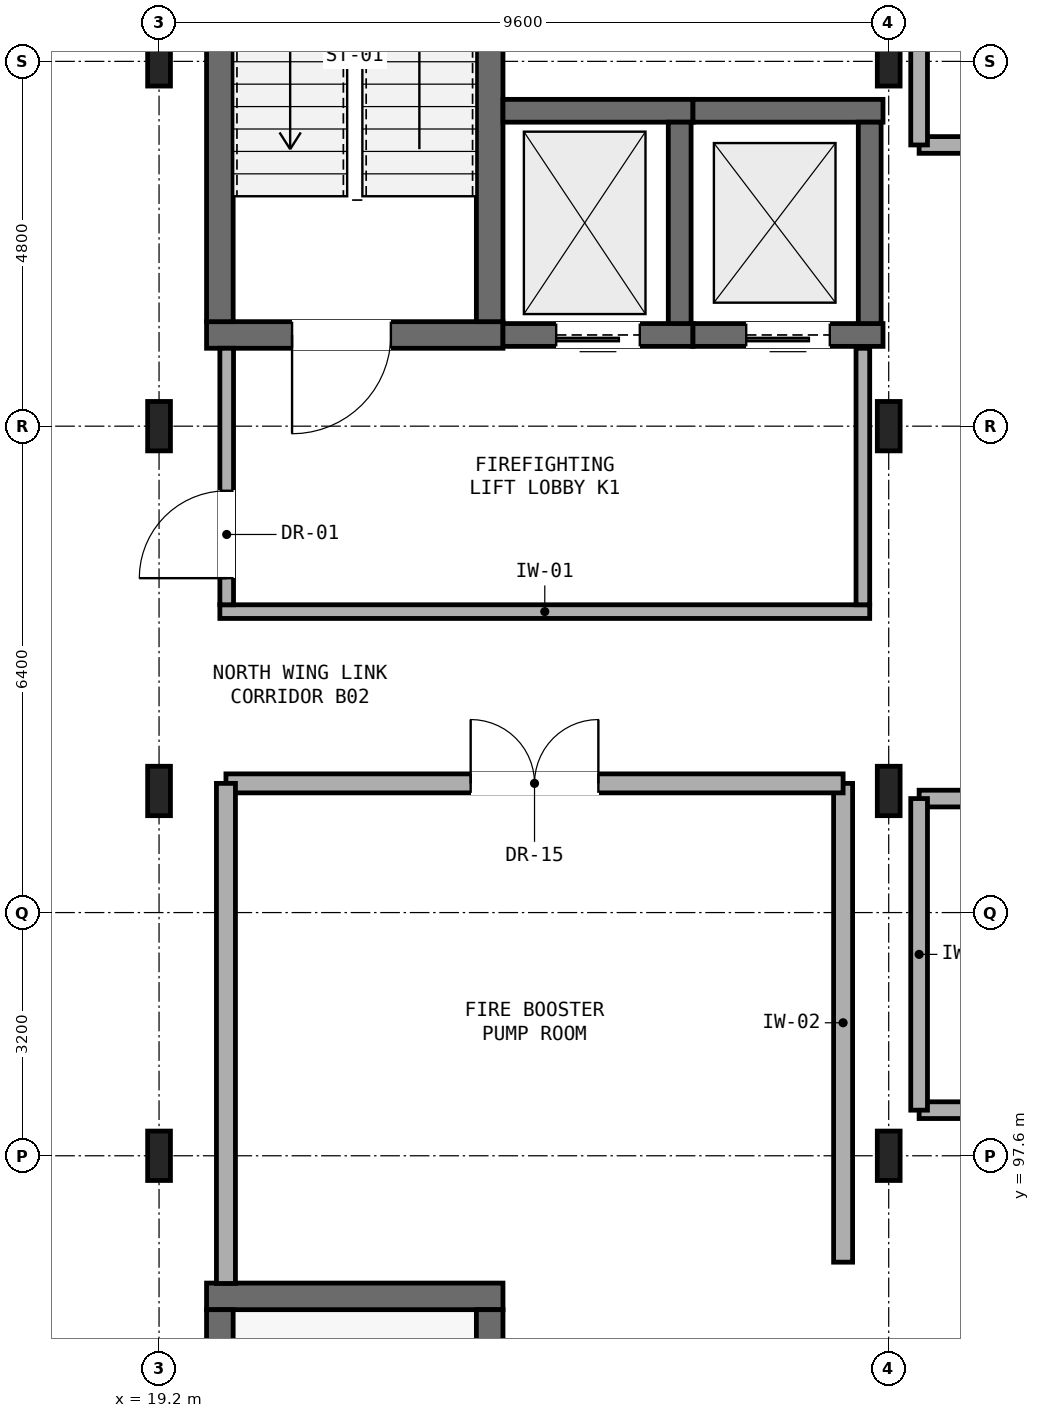
"""IFC4 building model, lengths in metres.
Left out: names, types, materials, properties, quantities, classifications, styles, units other than length and angle.
Written with IfcOpenShell. Run it as: python <this file> out.ifc"""

import sys

from ifc_helpers import new_model, si_unit, direction, frame, frame_2d, origin, origin_2d, place, context, subcontext, project, spatial, rectangle, i_section, extrude, element, fill, save


model = new_model("IFC4")
c1 = context("Model", 3, precision=1e-05, world=origin(), true_north=direction((0.0, 1.0)))
c2 = subcontext(c1, "Body", "Model", "MODEL_VIEW")
j1 = project(units=[si_unit("LENGTHUNIT", "METRE"), si_unit("PLANEANGLEUNIT", "RADIAN")], contexts=[c1])
p1 = place(None, origin())
s1 = spatial("IfcSite", under=j1, at=p1, CompositionType="ELEMENT")
p2 = place(p1, origin())
s2 = spatial("IfcBuilding", under=s1, at=p2, CompositionType="ELEMENT")
p3 = place(p2, frame((0.0, 0.0, -9.8)))
s3 = spatial("IfcBuildingStorey", under=s2, at=p3, CompositionType="ELEMENT", Elevation=-9.8)
for number, where, z_axis, x_axis in (
    (1, (28.8, 97.6, 0.0), (0.0, 0.0, 1.0), (1.0, 0.0, 0.0)),
    (2, (28.8, 102.4, 0.0), (0.0, 0.0, 1.0), (1.0, 0.0, 0.0)),
    (3, (28.8, 107.2, 0.0), (0.0, 0.0, 1.0), (1.0, 0.0, 0.0)),
    (4, (28.8, 112.0, 0.0), (0.0, 0.0, 1.0), (1.0, 0.0, 0.0)),
    (5, (19.2, 97.6, 0.0), (0.0, 0.0, 1.0), (1.0, 0.0, 0.0)),
    (6, (19.2, 102.4, 0.0), (0.0, 0.0, 1.0), (1.0, 0.0, 0.0)),
    (7, (19.2, 107.2, 0.0), (0.0, 0.0, 1.0), (1.0, 0.0, 0.0)),
    (8, (19.2, 112.0, 0.0), (0.0, 0.0, 1.0), (1.0, 0.0, 0.0)),
):
    element("IfcColumn", number, at=place(p3, frame(where, z_axis=z_axis, x_axis=x_axis)), inside=s3, PredefinedType="COLUMN", context=c2, shape_type="SweptSolid", body=[
        extrude(i_section(OverallWidth=0.3, OverallDepth=0.65, WebThickness=0.016, FlangeThickness=0.031, FilletRadius=0.027, at=origin_2d()), origin(), (0.0, 0.0, 1.0), 5.25),
    ])
p4 = place(p3, frame((19.825, 108.4, 0.0), z_axis=(0.0, 0.0, 1.0), x_axis=(1.0, 0.0, 0.0)))
e9 = element("IfcWall", 9, at=p4, inside=s3, PredefinedType="SHEAR", context=c2, shape_type="SweptSolid", body=[
    extrude(rectangle(XDim=3.9, YDim=0.35, at=frame_2d((1.95, 0.0))), origin(), (0.0, 0.0, 1.0), 4.97),
])
p5 = place(p4, frame((1.125, 0.0, 0.0)))
e10 = element("IfcOpeningElement", 10, at=p5, cuts=e9, PredefinedType="OPENING", context=c2, shape_type="SweptSolid", body=[
    extrude(rectangle(XDim=1.3, YDim=2.15, at=frame_2d((0.65, 1.075))), frame((0.0, 0.185, 0.0), z_axis=(0.0, -1.0, 0.0), x_axis=(1.0, 0.0, 0.0)), (0.0, 0.0, 1.0), 0.37),
])
for number, where, z_axis, x_axis in (
    (11, (20.0, 108.575, 0.0), (0.0, 0.0, 1.0), (0.0, 1.0, 0.0)),
    (12, (23.55, 108.575, 0.0), (0.0, 0.0, 1.0), (0.0, 1.0, 0.0)),
):
    element("IfcWall", number, at=place(p3, frame(where, z_axis=z_axis, x_axis=x_axis)), inside=s3, PredefinedType="SHEAR", context=c2, shape_type="SweptSolid", body=[
        extrude(rectangle(XDim=7.6, YDim=0.35, at=frame_2d((3.8, 0.0))), origin(), (0.0, 0.0, 1.0), 4.97),
    ])
p6 = place(p3, frame((23.725, 108.4, 0.0), z_axis=(0.0, 0.0, 1.0), x_axis=(1.0, 0.0, 0.0)))
e13 = element("IfcWall", 13, at=p6, inside=s3, PredefinedType="SHEAR", context=c2, shape_type="SweptSolid", body=[
    extrude(rectangle(XDim=2.5, YDim=0.3, at=frame_2d((1.25, 0.0))), origin(), (0.0, 0.0, 1.0), 4.97),
])
p7 = place(p6, frame((0.7, 0.0, 0.0)))
e14 = element("IfcOpeningElement", 14, at=p7, cuts=e13, PredefinedType="OPENING", context=c2, shape_type="SweptSolid", body=[
    extrude(rectangle(XDim=1.1, YDim=2.1, at=frame_2d((0.55, 1.05))), frame((0.0, 0.16, 0.0), z_axis=(0.0, -1.0, 0.0), x_axis=(1.0, 0.0, 0.0)), (0.0, 0.0, 1.0), 0.32),
])
p8 = place(p3, frame((23.725, 111.35, 0.0), z_axis=(0.0, 0.0, 1.0), x_axis=(1.0, 0.0, 0.0)))
e15 = element("IfcWall", 15, at=p8, inside=s3, PredefinedType="SHEAR", context=c2, shape_type="SweptSolid", body=[
    extrude(rectangle(XDim=2.5, YDim=0.3, at=frame_2d((1.25, 0.0))), origin(), (0.0, 0.0, 1.0), 4.97),
])
p9 = place(p3, frame((26.05, 108.55, 0.0), z_axis=(0.0, 0.0, 1.0), x_axis=(0.0, 1.0, 0.0)))
e16 = element("IfcWall", 16, at=p9, inside=s3, PredefinedType="SHEAR", context=c2, shape_type="SweptSolid", body=[
    extrude(rectangle(XDim=2.65, YDim=0.3, at=frame_2d((1.325, 0.0))), origin(), (0.0, 0.0, 1.0), 4.97),
])
p10 = place(p3, frame((26.225, 108.4, 0.0), z_axis=(0.0, 0.0, 1.0), x_axis=(1.0, 0.0, 0.0)))
e17 = element("IfcWall", 17, at=p10, inside=s3, PredefinedType="SHEAR", context=c2, shape_type="SweptSolid", body=[
    extrude(rectangle(XDim=2.5, YDim=0.3, at=frame_2d((1.25, 0.0))), origin(), (0.0, 0.0, 1.0), 4.97),
])
p11 = place(p10, frame((0.7, 0.0, 0.0)))
e18 = element("IfcOpeningElement", 18, at=p11, cuts=e17, PredefinedType="OPENING", context=c2, shape_type="SweptSolid", body=[
    extrude(rectangle(XDim=1.1, YDim=2.1, at=frame_2d((0.55, 1.05))), frame((0.0, 0.16, 0.0), z_axis=(0.0, -1.0, 0.0), x_axis=(1.0, 0.0, 0.0)), (0.0, 0.0, 1.0), 0.32),
])
p12 = place(p3, frame((26.225, 111.35, 0.0), z_axis=(0.0, 0.0, 1.0), x_axis=(1.0, 0.0, 0.0)))
e19 = element("IfcWall", 19, at=p12, inside=s3, PredefinedType="SHEAR", context=c2, shape_type="SweptSolid", body=[
    extrude(rectangle(XDim=2.5, YDim=0.3, at=frame_2d((1.25, 0.0))), origin(), (0.0, 0.0, 1.0), 4.97),
])
p13 = place(p3, frame((28.55, 108.55, 0.0), z_axis=(0.0, 0.0, 1.0), x_axis=(0.0, 1.0, 0.0)))
e20 = element("IfcWall", 20, at=p13, inside=s3, PredefinedType="SHEAR", context=c2, shape_type="SweptSolid", body=[
    extrude(rectangle(XDim=2.65, YDim=0.3, at=frame_2d((1.325, 0.0))), origin(), (0.0, 0.0, 1.0), 4.97),
])
p14 = place(p3, frame((20.0, 104.76, 0.0), z_axis=(0.0, 0.0, 1.0), x_axis=(1.0, 0.0, 0.0)))
e21 = element("IfcWall", 21, at=p14, inside=s3, PredefinedType="PARTITIONING", context=c2, shape_type="SweptSolid", body=[
    extrude(rectangle(XDim=8.55, YDim=0.18, at=frame_2d((4.275, 0.0))), origin(), (0.0, 0.0, 1.0), 4.45),
])
p15 = place(p3, frame((20.09, 104.85, 0.0), z_axis=(0.0, 0.0, 1.0), x_axis=(0.0, 1.0, 0.0)))
e22 = element("IfcWall", 22, at=p15, inside=s3, PredefinedType="PARTITIONING", context=c2, shape_type="SweptSolid", body=[
    extrude(rectangle(XDim=3.375, YDim=0.18, at=frame_2d((1.688, 0.0))), origin(), (0.0, 0.0, 1.0), 4.97),
])
p16 = place(p15, frame((0.35, 0.0, 0.0)))
e23 = element("IfcOpeningElement", 23, at=p16, cuts=e22, PredefinedType="OPENING", context=c2, shape_type="SweptSolid", body=[
    extrude(rectangle(XDim=1.15, YDim=2.15, at=frame_2d((0.575, 1.075))), frame((0.0, 0.1, 0.0), z_axis=(0.0, -1.0, 0.0), x_axis=(1.0, 0.0, 0.0)), (0.0, 0.0, 1.0), 0.2),
])
p17 = place(p3, frame((28.46, 104.85, 0.0), z_axis=(0.0, 0.0, 1.0), x_axis=(0.0, 1.0, 0.0)))
e24 = element("IfcWall", 24, at=p17, inside=s3, PredefinedType="PARTITIONING", context=c2, shape_type="SweptSolid", body=[
    extrude(rectangle(XDim=3.375, YDim=0.18, at=frame_2d((1.688, 0.0))), origin(), (0.0, 0.0, 1.0), 4.97),
])
p18 = place(p3, frame((19.825, 95.75, 0.0), z_axis=(0.0, 0.0, 1.0), x_axis=(1.0, 0.0, 0.0)))
e25 = element("IfcWall", 25, at=p18, inside=s3, PredefinedType="SHEAR", context=c2, shape_type="SweptSolid", body=[
    extrude(rectangle(XDim=3.9, YDim=0.35, at=frame_2d((1.95, 0.0))), origin(), (0.0, 0.0, 1.0), 4.97),
])
for number, where, z_axis, x_axis in (
    (26, (20.0, 87.975, 0.0), (0.0, 0.0, 1.0), (0.0, 1.0, 0.0)),
    (27, (23.55, 87.975, 0.0), (0.0, 0.0, 1.0), (0.0, 1.0, 0.0)),
):
    element("IfcWall", number, at=place(p3, frame(where, z_axis=z_axis, x_axis=x_axis)), inside=s3, PredefinedType="SHEAR", context=c2, shape_type="SweptSolid", body=[
        extrude(rectangle(XDim=7.6, YDim=0.35, at=frame_2d((3.8, 0.0))), origin(), (0.0, 0.0, 1.0), 4.97),
    ])
p19 = place(p3, frame((28.2, 96.2, 0.0), z_axis=(0.0, 0.0, 1.0), x_axis=(0.0, 1.0, 0.0)))
e28 = element("IfcWall", 28, at=p19, inside=s3, PredefinedType="SOLIDWALL", context=c2, shape_type="SweptSolid", body=[
    extrude(rectangle(XDim=6.3, YDim=0.25, at=frame_2d((3.15, 0.0))), origin(), (0.0, 0.0, 1.0), 4.97),
])
p20 = place(p3, frame((28.2, 102.5, 0.0), z_axis=(0.0, 0.0, 1.0), x_axis=(-1.0, 0.0, 0.0)))
e29 = element("IfcWall", 29, at=p20, inside=s3, PredefinedType="SOLIDWALL", context=c2, shape_type="SweptSolid", body=[
    extrude(rectangle(XDim=8.12, YDim=0.25, at=frame_2d((4.06, 0.0))), origin(), (0.0, 0.0, 1.0), 4.05),
])
p21 = place(p20, frame((3.22, 0.0, 0.0)))
e30 = element("IfcOpeningElement", 30, at=p21, cuts=e29, PredefinedType="OPENING", context=c2, shape_type="SweptSolid", body=[
    extrude(rectangle(XDim=1.68, YDim=2.2, at=frame_2d((0.84, 1.1))), frame((0.0, 0.135, 0.0), z_axis=(0.0, -1.0, 0.0), x_axis=(1.0, 0.0, 0.0)), (0.0, 0.0, 1.0), 0.27),
])
p22 = place(p3, frame((20.08, 102.5, 0.0), z_axis=(0.0, 0.0, 1.0), x_axis=(0.0, -1.0, 0.0)))
e31 = element("IfcWall", 31, at=p22, inside=s3, PredefinedType="SOLIDWALL", context=c2, shape_type="SweptSolid", body=[
    extrude(rectangle(XDim=6.58, YDim=0.25, at=frame_2d((3.29, 0.0))), origin(), (0.0, 0.0, 1.0), 4.97),
])
p23 = place(p3, frame((29.2, 110.9, 0.0), z_axis=(0.0, 0.0, 1.0), x_axis=(1.0, 0.0, 0.0)))
e32 = element("IfcWall", 32, at=p23, inside=s3, PredefinedType="PARTITIONING", context=c2, shape_type="SweptSolid", body=[
    extrude(rectangle(XDim=28.4, YDim=0.22, at=frame_2d((14.2, 0.0))), origin(), (0.0, 0.0, 1.0), 4.97),
])
p24 = place(p23, frame((13.36, 0.0, 0.0)))
e33 = element("IfcOpeningElement", 33, at=p24, cuts=e32, PredefinedType="OPENING", context=c2, shape_type="SweptSolid", body=[
    extrude(rectangle(XDim=1.68, YDim=2.2, at=frame_2d((0.84, 1.1))), frame((0.0, 0.12, 0.0), z_axis=(0.0, -1.0, 0.0), x_axis=(1.0, 0.0, 0.0)), (0.0, 0.0, 1.0), 0.24),
])
p25 = place(p3, frame((29.2, 116.2, 0.0), z_axis=(0.0, 0.0, 1.0), x_axis=(0.0, -1.0, 0.0)))
e34 = element("IfcWall", 34, at=p25, inside=s3, PredefinedType="PARTITIONING", context=c2, shape_type="SweptSolid", body=[
    extrude(rectangle(XDim=5.3, YDim=0.22, at=frame_2d((2.65, 0.0))), origin(), (0.0, 0.0, 1.0), 4.97),
])
p26 = place(p3, frame((29.2, 98.2, 0.0), z_axis=(0.0, 0.0, 1.0), x_axis=(1.0, 0.0, 0.0)))
e35 = element("IfcWall", 35, at=p26, inside=s3, PredefinedType="PARTITIONING", context=c2, shape_type="SweptSolid", body=[
    extrude(rectangle(XDim=28.4, YDim=0.22, at=frame_2d((14.2, 0.0))), origin(), (0.0, 0.0, 1.0), 4.97),
])
p27 = place(p3, frame((57.6, 102.3, 0.0), z_axis=(0.0, 0.0, 1.0), x_axis=(-1.0, 0.0, 0.0)))
e36 = element("IfcWall", 36, at=p27, inside=s3, PredefinedType="PARTITIONING", context=c2, shape_type="SweptSolid", body=[
    extrude(rectangle(XDim=28.4, YDim=0.22, at=frame_2d((14.2, 0.0))), origin(), (0.0, 0.0, 1.0), 4.41),
])
p28 = place(p27, frame((13.36, 0.0, 0.0)))
e37 = element("IfcOpeningElement", 37, at=p28, cuts=e36, PredefinedType="OPENING", context=c2, shape_type="SweptSolid", body=[
    extrude(rectangle(XDim=1.68, YDim=2.2, at=frame_2d((0.84, 1.1))), frame((0.0, 0.12, 0.0), z_axis=(0.0, -1.0, 0.0), x_axis=(1.0, 0.0, 0.0)), (0.0, 0.0, 1.0), 0.24),
])
p29 = place(p3, frame((29.2, 102.3, 0.0), z_axis=(0.0, 0.0, 1.0), x_axis=(0.0, -1.0, 0.0)))
e38 = element("IfcWall", 38, at=p29, inside=s3, PredefinedType="PARTITIONING", context=c2, shape_type="SweptSolid", body=[
    extrude(rectangle(XDim=4.1, YDim=0.22, at=frame_2d((2.05, 0.0))), origin(), (0.0, 0.0, 1.0), 4.97),
])
p30 = place(p5, frame((1.3, 0.0, 0.0), z_axis=(0.0, 0.0, 1.0), x_axis=(-1.0, 0.0, 0.0)))
e39 = element("IfcDoor", 39, at=p30, inside=s3, OperationType="SINGLE_SWING_LEFT", PredefinedType="DOOR", context=c2, shape_type="SweptSolid", body=[
    extrude(rectangle(XDim=1.3, YDim=2.15, at=frame_2d((0.65, 1.075))), frame((0.0, 0.025, 0.0), z_axis=(0.0, -1.0, 0.0), x_axis=(1.0, 0.0, 0.0)), (0.0, 0.0, 1.0), 0.05),
])
fill(e10, e39)
p31 = place(p7, frame((1.1, 0.0, 0.0), z_axis=(0.0, 0.0, 1.0), x_axis=(-1.0, 0.0, 0.0)))
e40 = element("IfcDoor", 40, at=p31, inside=s3, OperationType="SLIDING_TO_LEFT", PredefinedType="DOOR", context=c2, shape_type="SweptSolid", body=[
    extrude(rectangle(XDim=1.1, YDim=2.1, at=frame_2d((0.55, 1.05))), frame((0.0, 0.025, 0.0), z_axis=(0.0, -1.0, 0.0), x_axis=(1.0, 0.0, 0.0)), (0.0, 0.0, 1.0), 0.05),
])
fill(e14, e40)
p32 = place(p11, frame((1.1, 0.0, 0.0), z_axis=(0.0, 0.0, 1.0), x_axis=(-1.0, 0.0, 0.0)))
e41 = element("IfcDoor", 41, at=p32, inside=s3, OperationType="SLIDING_TO_LEFT", PredefinedType="DOOR", context=c2, shape_type="SweptSolid", body=[
    extrude(rectangle(XDim=1.1, YDim=2.1, at=frame_2d((0.55, 1.05))), frame((0.0, 0.025, 0.0), z_axis=(0.0, -1.0, 0.0), x_axis=(1.0, 0.0, 0.0)), (0.0, 0.0, 1.0), 0.05),
])
fill(e18, e41)
p33 = place(p16, origin())
e42 = element("IfcDoor", 42, at=p33, inside=s3, OperationType="SINGLE_SWING_LEFT", PredefinedType="DOOR", context=c2, shape_type="SweptSolid", body=[
    extrude(rectangle(XDim=1.15, YDim=2.15, at=frame_2d((0.575, 1.075))), frame((0.0, 0.025, 0.0), z_axis=(0.0, -1.0, 0.0), x_axis=(1.0, 0.0, 0.0)), (0.0, 0.0, 1.0), 0.05),
])
fill(e23, e42)
p34 = place(p21, frame((1.68, 0.0, 0.0), z_axis=(0.0, 0.0, 1.0), x_axis=(-1.0, 0.0, 0.0)))
e43 = element("IfcDoor", 43, at=p34, inside=s3, OperationType="DOUBLE_DOOR_SINGLE_SWING", PredefinedType="DOOR", context=c2, shape_type="SweptSolid", body=[
    extrude(rectangle(XDim=1.68, YDim=2.2, at=frame_2d((0.84, 1.1))), frame((0.0, 0.025, 0.0), z_axis=(0.0, -1.0, 0.0), x_axis=(1.0, 0.0, 0.0)), (0.0, 0.0, 1.0), 0.05),
])
fill(e30, e43)
save(model, sys.argv[1])
